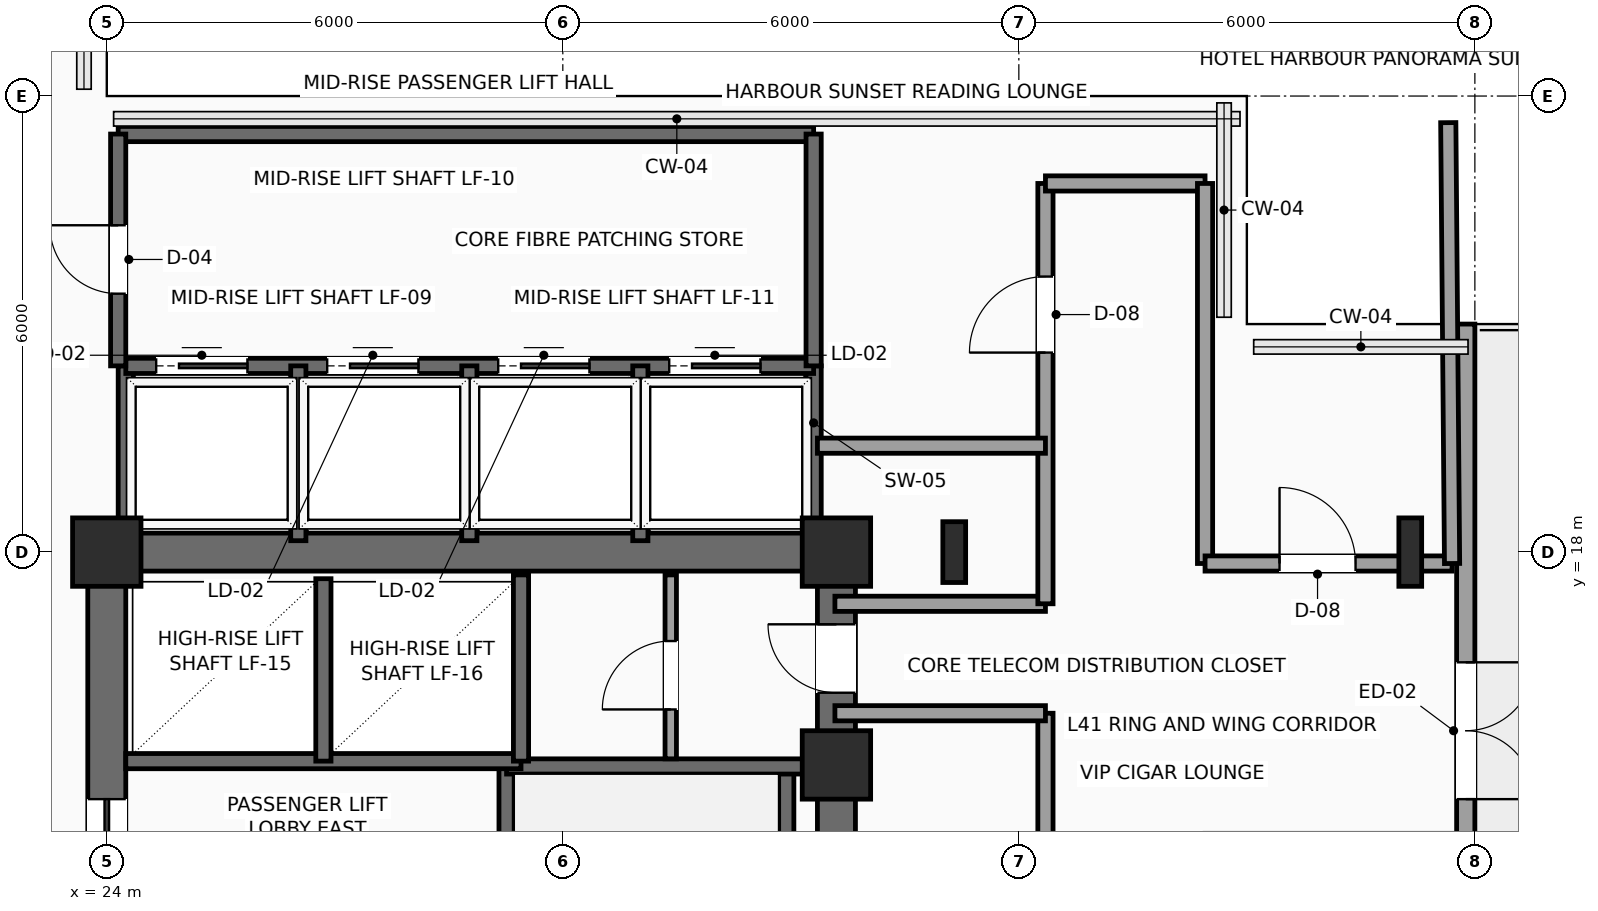
"""IFC4 building model, lengths in metres.
Left out: names, types, materials, properties, quantities, classifications, styles, units other than length and angle.
Written with IfcOpenShell. Run it as: python <this file> out.ifc"""

import sys

from ifc_helpers import new_model, si_unit, direction, frame, frame_2d, origin, origin_2d, place, context, subcontext, project, spatial, rectangle, i_section, extrude, element, fill, save


model = new_model("IFC4")
c1 = context("Model", 3, precision=1e-05, world=origin(), true_north=direction((0.0, 1.0)))
c2 = subcontext(c1, "Body", "Model", "MODEL_VIEW")
j1 = project(units=[si_unit("LENGTHUNIT", "METRE"), si_unit("PLANEANGLEUNIT", "RADIAN")], contexts=[c1])
p1 = place(None, origin())
s1 = spatial("IfcSite", under=j1, at=p1, CompositionType="ELEMENT")
p2 = place(p1, origin())
s2 = spatial("IfcBuilding", under=s1, at=p2, CompositionType="ELEMENT")
p3 = place(p2, frame((0.0, 0.0, 169.2)))
s3 = spatial("IfcBuildingStorey", under=s2, at=p3, CompositionType="ELEMENT", Elevation=169.2)
for number, where, z_axis, x_axis in (
    (1, (24.0, 18.0, 0.0), (0.0, 0.0, 1.0), (1.0, 0.0, 0.0)),
    (2, (33.6, 15.2, 0.0), (0.0, 0.0, 1.0), (1.0, 0.0, 0.0)),
    (3, (33.6, 18.0, 0.0), (0.0, 0.0, 1.0), (1.0, 0.0, 0.0)),
):
    element("IfcColumn", number, at=place(p3, frame(where, z_axis=z_axis, x_axis=x_axis)), inside=s3, PredefinedType="COLUMN", context=c2, shape_type="SweptSolid", body=[
        extrude(rectangle(XDim=0.9, YDim=0.9, at=origin_2d()), origin(), (0.0, 0.0, 1.0), 3.75),
    ])
p4 = place(p3, frame((35.15, 18.0, 0.0), z_axis=(0.0, 0.0, 1.0), x_axis=(1.0, 0.0, 0.0)))
e4 = element("IfcColumn", 4, at=p4, inside=s3, PredefinedType="COLUMN", context=c2, shape_type="SweptSolid", body=[
    extrude(i_section(OverallWidth=0.3, OverallDepth=0.8, WebThickness=0.018, FlangeThickness=0.033, FilletRadius=0.03, at=origin_2d()), origin(), (0.0, 0.0, 1.0), 3.75),
])
p5 = place(p3, frame((41.15, 18.0, 0.0), z_axis=(0.0, 0.0, 1.0), x_axis=(1.0, 0.0, 0.0)))
e5 = element("IfcColumn", 5, at=p5, inside=s3, PredefinedType="COLUMN", context=c2, shape_type="SweptSolid", body=[
    extrude(i_section(OverallWidth=0.3, OverallDepth=0.9, WebThickness=0.019, FlangeThickness=0.035, FilletRadius=0.03, at=origin_2d()), origin(), (0.0, 0.0, 1.0), 3.75),
])
p6 = place(p3, frame((41.88, 21.0, 0.0), z_axis=(0.0, 0.0, 1.0), x_axis=(0.0, -1.0, 0.0)))
e6 = element("IfcWall", 6, at=p6, inside=s3, PredefinedType="SOLIDWALL", context=c2, shape_type="SweptSolid", body=[
    extrude(rectangle(XDim=18.0, YDim=0.24, at=frame_2d((9.0, 0.0))), origin(), (0.0, 0.0, 1.0), 3.54),
])
p7 = place(p6, frame((4.45, 0.0, 0.0)))
e7 = element("IfcOpeningElement", 7, at=p7, cuts=e6, PredefinedType="OPENING", context=c2, shape_type="SweptSolid", body=[
    extrude(rectangle(XDim=1.8, YDim=2.4, at=frame_2d((0.9, 1.2))), frame((0.0, 0.13, 0.0), z_axis=(0.0, -1.0, 0.0), x_axis=(1.0, 0.0, 0.0)), (0.0, 0.0, 1.0), 0.26),
])
p8 = place(p3, frame((24.0, 18.0, 0.0), z_axis=(0.0, 0.0, 1.0), x_axis=(1.0, 0.0, 0.0)))
e8 = element("IfcWall", 8, at=p8, inside=s3, PredefinedType="SHEAR", context=c2, shape_type="SweptSolid", body=[
    extrude(rectangle(XDim=9.6, YDim=0.5, at=frame_2d((4.8, 0.0))), origin(), (0.0, 0.0, 1.0), 3.54),
])
p9 = place(p3, frame((24.0, 6.0, 0.0), z_axis=(0.0, 0.0, 1.0), x_axis=(0.0, 1.0, 0.0)))
e9 = element("IfcWall", 9, at=p9, inside=s3, PredefinedType="SHEAR", context=c2, shape_type="SweptSolid", body=[
    extrude(rectangle(XDim=12.0, YDim=0.5, at=frame_2d((6.0, 0.0))), origin(), (0.0, 0.0, 1.0), 3.54),
])
p10 = place(p9, frame((7.15, 0.0, 0.0)))
e10 = element("IfcOpeningElement", 10, at=p10, cuts=e9, PredefinedType="OPENING", context=c2, shape_type="SweptSolid", body=[
    extrude(rectangle(XDim=1.6, YDim=2.3, at=frame_2d((0.8, 1.15))), frame((0.0, 0.26, 0.0), z_axis=(0.0, -1.0, 0.0), x_axis=(1.0, 0.0, 0.0)), (0.0, 0.0, 1.0), 0.52),
])
p11 = place(p3, frame((33.6, 6.0, 0.0), z_axis=(0.0, 0.0, 1.0), x_axis=(0.0, 1.0, 0.0)))
e11 = element("IfcWall", 11, at=p11, inside=s3, PredefinedType="SHEAR", context=c2, shape_type="SweptSolid", body=[
    extrude(rectangle(XDim=12.0, YDim=0.5, at=frame_2d((6.0, 0.0))), origin(), (0.0, 0.0, 1.0), 3.54),
])
p12 = place(p11, frame((10.15, 0.0, 0.0)))
e12 = element("IfcOpeningElement", 12, at=p12, cuts=e11, PredefinedType="OPENING", context=c2, shape_type="SweptSolid", body=[
    extrude(rectangle(XDim=0.9, YDim=2.15, at=frame_2d((0.45, 1.075))), frame((0.0, 0.26, 0.0), z_axis=(0.0, -1.0, 0.0), x_axis=(1.0, 0.0, 0.0)), (0.0, 0.0, 1.0), 0.52),
])
p13 = place(p3, frame((29.26, 6.3, 0.0), z_axis=(0.0, 0.0, 1.0), x_axis=(0.0, 1.0, 0.0)))
e13 = element("IfcWall", 13, at=p13, inside=s3, PredefinedType="SHEAR", context=c2, shape_type="SweptSolid", body=[
    extrude(rectangle(XDim=8.88, YDim=0.2, at=frame_2d((4.44, 0.0))), origin(), (0.0, 0.0, 1.0), 3.54),
])
p14 = place(p13, frame((0.35, 0.0, 0.0)))
e14 = element("IfcOpeningElement", 14, at=p14, cuts=e13, PredefinedType="OPENING", context=c2, shape_type="SweptSolid", body=[
    extrude(rectangle(XDim=1.1, YDim=2.2, at=frame_2d((0.55, 1.1))), frame((0.0, 0.11, 0.0), z_axis=(0.0, -1.0, 0.0), x_axis=(1.0, 0.0, 0.0)), (0.0, 0.0, 1.0), 0.22),
])
p15 = place(p3, frame((32.94, 6.3, 0.0), z_axis=(0.0, 0.0, 1.0), x_axis=(0.0, 1.0, 0.0)))
e15 = element("IfcWall", 15, at=p15, inside=s3, PredefinedType="SHEAR", context=c2, shape_type="SweptSolid", body=[
    extrude(rectangle(XDim=8.88, YDim=0.2, at=frame_2d((4.44, 0.0))), origin(), (0.0, 0.0, 1.0), 3.54),
])
p16 = place(p3, frame((29.26, 15.18, 0.0), z_axis=(0.0, 0.0, 1.0), x_axis=(1.0, 0.0, 0.0)))
e16 = element("IfcWall", 16, at=p16, inside=s3, PredefinedType="SHEAR", context=c2, shape_type="SweptSolid", body=[
    extrude(rectangle(XDim=4.04, YDim=0.2, at=frame_2d((2.02, 0.0))), origin(), (0.0, 0.0, 1.0), 3.54),
])
p17 = place(p3, frame((24.25, 15.25, 0.0), z_axis=(0.0, 0.0, 1.0), x_axis=(1.0, 0.0, 0.0)))
e17 = element("IfcWall", 17, at=p17, inside=s3, PredefinedType="SHEAR", context=c2, shape_type="SweptSolid", body=[
    extrude(rectangle(XDim=5.2, YDim=0.2, at=frame_2d((2.6, 0.0))), origin(), (0.0, 0.0, 1.0), 3.54),
])
p18 = place(p3, frame((26.85, 15.25, 0.0), z_axis=(0.0, 0.0, 1.0), x_axis=(0.0, 1.0, 0.0)))
e18 = element("IfcWall", 18, at=p18, inside=s3, PredefinedType="SHEAR", context=c2, shape_type="SweptSolid", body=[
    extrude(rectangle(XDim=2.4, YDim=0.2, at=frame_2d((1.2, 0.0))), origin(), (0.0, 0.0, 1.0), 3.54),
])
p19 = place(p3, frame((29.45, 15.25, 0.0), z_axis=(0.0, 0.0, 1.0), x_axis=(0.0, 1.0, 0.0)))
e19 = element("IfcWall", 19, at=p19, inside=s3, PredefinedType="SHEAR", context=c2, shape_type="SweptSolid", body=[
    extrude(rectangle(XDim=2.45, YDim=0.2, at=frame_2d((1.225, 0.0))), origin(), (0.0, 0.0, 1.0), 3.54),
])
p20 = place(p3, frame((31.42, 15.28, 0.0), z_axis=(0.0, 0.0, 1.0), x_axis=(0.0, 1.0, 0.0)))
e20 = element("IfcWall", 20, at=p20, inside=s3, PredefinedType="PARTITIONING", context=c2, shape_type="SweptSolid", body=[
    extrude(rectangle(XDim=2.42, YDim=0.15, at=frame_2d((1.21, 0.0))), origin(), (0.0, 0.0, 1.0), 3.54),
])
p21 = place(p20, frame((0.65, 0.0, 0.0)))
e21 = element("IfcOpeningElement", 21, at=p21, cuts=e20, PredefinedType="OPENING", context=c2, shape_type="SweptSolid", body=[
    extrude(rectangle(XDim=0.9, YDim=2.15, at=frame_2d((0.45, 1.075))), frame((0.0, 0.085, 0.0), z_axis=(0.0, -1.0, 0.0), x_axis=(1.0, 0.0, 0.0)), (0.0, 0.0, 1.0), 0.17),
])
for number, where, z_axis, x_axis in (
    (22, (33.3, 18.1, 0.0), (0.0, 0.0, 1.0), (0.0, 1.0, 0.0)),
    (23, (24.25, 18.1, 0.0), (0.0, 0.0, 1.0), (0.0, 1.0, 0.0)),
):
    element("IfcWall", number, at=place(p3, frame(where, z_axis=z_axis, x_axis=x_axis)), inside=s3, PredefinedType="SHEAR", context=c2, shape_type="SweptSolid", body=[
        extrude(rectangle(XDim=2.35, YDim=0.2, at=frame_2d((1.175, 0.0))), origin(), (0.0, 0.0, 1.0), 3.54),
    ])
p22 = place(p3, frame((24.25, 20.45, 0.0), z_axis=(0.0, 0.0, 1.0), x_axis=(1.0, 0.0, 0.0)))
e24 = element("IfcWall", 24, at=p22, inside=s3, PredefinedType="SHEAR", context=c2, shape_type="SweptSolid", body=[
    extrude(rectangle(XDim=9.05, YDim=0.2, at=frame_2d((4.525, 0.0))), origin(), (0.0, 0.0, 1.0), 3.54),
])
p23 = place(p22, frame((0.4, 0.0, 0.0)))
e25 = element("IfcOpeningElement", 25, at=p23, cuts=e24, PredefinedType="OPENING", context=c2, shape_type="SweptSolid", body=[
    extrude(rectangle(XDim=1.2, YDim=2.2, at=frame_2d((0.6, 1.1))), frame((0.0, 0.11, 0.0), z_axis=(0.0, -1.0, 0.0), x_axis=(1.0, 0.0, 0.0)), (0.0, 0.0, 1.0), 0.22),
])
p24 = place(p22, frame((2.65, 0.0, 0.0)))
e26 = element("IfcOpeningElement", 26, at=p24, cuts=e24, PredefinedType="OPENING", context=c2, shape_type="SweptSolid", body=[
    extrude(rectangle(XDim=1.2, YDim=2.2, at=frame_2d((0.6, 1.1))), frame((0.0, 0.11, 0.0), z_axis=(0.0, -1.0, 0.0), x_axis=(1.0, 0.0, 0.0)), (0.0, 0.0, 1.0), 0.22),
])
p25 = place(p22, frame((4.9, 0.0, 0.0)))
e27 = element("IfcOpeningElement", 27, at=p25, cuts=e24, PredefinedType="OPENING", context=c2, shape_type="SweptSolid", body=[
    extrude(rectangle(XDim=1.2, YDim=2.2, at=frame_2d((0.6, 1.1))), frame((0.0, 0.11, 0.0), z_axis=(0.0, -1.0, 0.0), x_axis=(1.0, 0.0, 0.0)), (0.0, 0.0, 1.0), 0.22),
])
p26 = place(p22, frame((7.15, 0.0, 0.0)))
e28 = element("IfcOpeningElement", 28, at=p26, cuts=e24, PredefinedType="OPENING", context=c2, shape_type="SweptSolid", body=[
    extrude(rectangle(XDim=1.2, YDim=2.2, at=frame_2d((0.6, 1.1))), frame((0.0, 0.11, 0.0), z_axis=(0.0, -1.0, 0.0), x_axis=(1.0, 0.0, 0.0)), (0.0, 0.0, 1.0), 0.22),
])
for number, where, z_axis, x_axis in (
    (29, (26.52, 18.15, 0.0), (0.0, 0.0, 1.0), (0.0, 1.0, 0.0)),
    (30, (28.77, 18.15, 0.0), (0.0, 0.0, 1.0), (0.0, 1.0, 0.0)),
    (31, (31.02, 18.15, 0.0), (0.0, 0.0, 1.0), (0.0, 1.0, 0.0)),
):
    element("IfcWall", number, at=place(p3, frame(where, z_axis=z_axis, x_axis=x_axis)), inside=s3, PredefinedType="SHEAR", context=c2, shape_type="SweptSolid", body=[
        extrude(rectangle(XDim=2.3, YDim=0.2, at=frame_2d((1.15, 0.0))), origin(), (0.0, 0.0, 1.0), 3.54),
    ])
p27 = place(p3, frame((24.15, 23.5, 0.0), z_axis=(0.0, 0.0, 1.0), x_axis=(1.0, 0.0, 0.0)))
e32 = element("IfcWall", 32, at=p27, inside=s3, PredefinedType="SHEAR", context=c2, shape_type="SweptSolid", body=[
    extrude(rectangle(XDim=9.15, YDim=0.2, at=frame_2d((4.575, 0.0))), origin(), (0.0, 0.0, 1.0), 3.54),
])
p28 = place(p3, frame((33.3, 20.45, 0.0), z_axis=(0.0, 0.0, 1.0), x_axis=(0.0, 1.0, 0.0)))
e33 = element("IfcWall", 33, at=p28, inside=s3, PredefinedType="SHEAR", context=c2, shape_type="SweptSolid", body=[
    extrude(rectangle(XDim=3.05, YDim=0.2, at=frame_2d((1.525, 0.0))), origin(), (0.0, 0.0, 1.0), 3.54),
])
p29 = place(p3, frame((24.15, 20.45, 0.0), z_axis=(0.0, 0.0, 1.0), x_axis=(0.0, 1.0, 0.0)))
e34 = element("IfcWall", 34, at=p29, inside=s3, PredefinedType="SHEAR", context=c2, shape_type="SweptSolid", body=[
    extrude(rectangle(XDim=3.05, YDim=0.2, at=frame_2d((1.525, 0.0))), origin(), (0.0, 0.0, 1.0), 3.54),
])
p30 = place(p29, frame((0.95, 0.0, 0.0)))
e35 = element("IfcOpeningElement", 35, at=p30, cuts=e34, PredefinedType="OPENING", context=c2, shape_type="SweptSolid", body=[
    extrude(rectangle(XDim=0.9, YDim=2.15, at=frame_2d((0.45, 1.075))), frame((0.0, 0.11, 0.0), z_axis=(0.0, -1.0, 0.0), x_axis=(1.0, 0.0, 0.0)), (0.0, 0.0, 1.0), 0.22),
])
p31 = place(p3, frame((36.35, 5.8, 0.0), z_axis=(0.0, 0.0, 1.0), x_axis=(0.0, 1.0, 0.0)))
e36 = element("IfcWall", 36, at=p31, inside=s3, PredefinedType="PARTITIONING", context=c2, shape_type="SweptSolid", body=[
    extrude(rectangle(XDim=10.08, YDim=0.2, at=frame_2d((5.04, 0.0))), origin(), (0.0, 0.0, 1.0), 3.54),
])
p32 = place(p31, frame((2.0, 0.0, 0.0)))
e37 = element("IfcOpeningElement", 37, at=p32, cuts=e36, PredefinedType="OPENING", context=c2, shape_type="SweptSolid", body=[
    extrude(rectangle(XDim=1.0, YDim=2.2, at=frame_2d((0.5, 1.1))), frame((0.0, 0.11, 0.0), z_axis=(0.0, -1.0, 0.0), x_axis=(1.0, 0.0, 0.0)), (0.0, 0.0, 1.0), 0.22),
])
p33 = place(p31, frame((7.04, 0.0, 0.0)))
e38 = element("IfcOpeningElement", 38, at=p33, cuts=e36, PredefinedType="OPENING", context=c2, shape_type="SweptSolid", body=[
    extrude(rectangle(XDim=1.0, YDim=2.2, at=frame_2d((0.5, 1.1))), frame((0.0, 0.11, 0.0), z_axis=(0.0, -1.0, 0.0), x_axis=(1.0, 0.0, 0.0)), (0.0, 0.0, 1.0), 0.22),
])
for number, where, z_axis, x_axis in (
    (39, (36.35, 15.88, 0.0), (0.0, 0.0, 1.0), (-1.0, 0.0, 0.0)),
    (40, (33.58, 17.32, 0.0), (0.0, 0.0, 1.0), (1.0, 0.0, 0.0)),
):
    element("IfcWall", number, at=place(p3, frame(where, z_axis=z_axis, x_axis=x_axis)), inside=s3, PredefinedType="PARTITIONING", context=c2, shape_type="SweptSolid", body=[
        extrude(rectangle(XDim=2.77, YDim=0.2, at=frame_2d((1.385, 0.0))), origin(), (0.0, 0.0, 1.0), 3.54),
    ])
p34 = place(p3, frame((36.35, 17.32, 0.0), z_axis=(0.0, 0.0, 1.0), x_axis=(0.0, 1.0, 0.0)))
e41 = element("IfcWall", 41, at=p34, inside=s3, PredefinedType="PARTITIONING", context=c2, shape_type="SweptSolid", body=[
    extrude(rectangle(XDim=5.53, YDim=0.2, at=frame_2d((2.765, 0.0))), origin(), (0.0, 0.0, 1.0), 3.54),
])
p35 = place(p34, frame((3.305, 0.0, 0.0)))
e42 = element("IfcOpeningElement", 42, at=p35, cuts=e41, PredefinedType="OPENING", context=c2, shape_type="SweptSolid", body=[
    extrude(rectangle(XDim=1.0, YDim=2.2, at=frame_2d((0.5, 1.1))), frame((0.0, 0.11, 0.0), z_axis=(0.0, -1.0, 0.0), x_axis=(1.0, 0.0, 0.0)), (0.0, 0.0, 1.0), 0.22),
])
p36 = place(p3, frame((36.35, 22.85, 0.0), z_axis=(0.0, 0.0, 1.0), x_axis=(1.0, 0.0, 0.0)))
e43 = element("IfcWall", 43, at=p36, inside=s3, PredefinedType="PARTITIONING", context=c2, shape_type="SweptSolid", body=[
    extrude(rectangle(XDim=2.1, YDim=0.2, at=frame_2d((1.05, 0.0))), origin(), (0.0, 0.0, 1.0), 3.54),
])
p37 = place(p3, frame((38.45, 22.85, 0.0), z_axis=(0.0, 0.0, 1.0), x_axis=(0.0, -1.0, 0.0)))
e44 = element("IfcWall", 44, at=p37, inside=s3, PredefinedType="PARTITIONING", context=c2, shape_type="SweptSolid", body=[
    extrude(rectangle(XDim=5.0, YDim=0.2, at=frame_2d((2.5, 0.0))), origin(), (0.0, 0.0, 1.0), 3.54),
])
p38 = place(p3, frame((38.45, 17.85, 0.0), z_axis=(0.0, 0.0, 1.0), x_axis=(1.0, 0.0, 0.0)))
e45 = element("IfcWall", 45, at=p38, inside=s3, PredefinedType="PARTITIONING", context=c2, shape_type="SweptSolid", body=[
    extrude(rectangle(XDim=3.25, YDim=0.2, at=frame_2d((1.625, 0.0))), origin(), (0.0, 0.0, 1.0), 3.132),
])
p39 = place(p38, frame((0.98, 0.0, 0.0)))
e46 = element("IfcOpeningElement", 46, at=p39, cuts=e45, PredefinedType="OPENING", context=c2, shape_type="SweptSolid", body=[
    extrude(rectangle(XDim=1.0, YDim=2.2, at=frame_2d((0.5, 1.1))), frame((0.0, 0.11, 0.0), z_axis=(0.0, -1.0, 0.0), x_axis=(1.0, 0.0, 0.0)), (0.0, 0.0, 1.0), 0.22),
])
p40 = place(p3, frame((41.7, 17.85, 0.0), z_axis=(0.0, 0.0, 1.0), x_axis=(-0.008629077606, 0.999962768817, 0.0)))
e47 = element("IfcWall", 47, at=p40, inside=s3, PredefinedType="PARTITIONING", context=c2, shape_type="SweptSolid", body=[
    extrude(rectangle(XDim=5.8, YDim=0.2, at=frame_2d((2.9, 0.0))), origin(), (0.0, 0.0, 1.0), 3.54),
])
p41 = place(p3, frame((33.35, 19.4, 0.0), z_axis=(0.0, 0.0, 1.0), x_axis=(1.0, 0.0, 0.0)))
e48 = element("IfcWall", 48, at=p41, inside=s3, PredefinedType="PARTITIONING", context=c2, shape_type="SweptSolid", body=[
    extrude(rectangle(XDim=3.0, YDim=0.2, at=frame_2d((1.5, 0.0))), origin(), (0.0, 0.0, 1.0), 3.54),
])
p42 = place(p7, origin())
e49 = element("IfcDoor", 49, at=p42, inside=s3, OperationType="DOUBLE_DOOR_SINGLE_SWING", PredefinedType="DOOR", context=c2, shape_type="SweptSolid", body=[
    extrude(rectangle(XDim=1.8, YDim=2.4, at=frame_2d((0.9, 1.2))), frame((0.0, 0.025, 0.0), z_axis=(0.0, -1.0, 0.0), x_axis=(1.0, 0.0, 0.0)), (0.0, 0.0, 1.0), 0.05),
])
fill(e7, e49)
p43 = place(p10, origin())
e50 = element("IfcDoor", 50, at=p43, inside=s3, OperationType="DOUBLE_DOOR_SLIDING", PredefinedType="DOOR", context=c2, shape_type="SweptSolid", body=[
    extrude(rectangle(XDim=1.6, YDim=2.3, at=frame_2d((0.8, 1.15))), frame((0.0, 0.025, 0.0), z_axis=(0.0, -1.0, 0.0), x_axis=(1.0, 0.0, 0.0)), (0.0, 0.0, 1.0), 0.05),
])
fill(e10, e50)
p44 = place(p12, origin())
e51 = element("IfcDoor", 51, at=p44, inside=s3, OperationType="SINGLE_SWING_RIGHT", PredefinedType="DOOR", context=c2, shape_type="SweptSolid", body=[
    extrude(rectangle(XDim=0.9, YDim=2.15, at=frame_2d((0.45, 1.075))), frame((0.0, 0.025, 0.0), z_axis=(0.0, -1.0, 0.0), x_axis=(1.0, 0.0, 0.0)), (0.0, 0.0, 1.0), 0.05),
])
fill(e12, e51)
p45 = place(p21, origin())
e52 = element("IfcDoor", 52, at=p45, inside=s3, OperationType="SINGLE_SWING_LEFT", PredefinedType="DOOR", context=c2, shape_type="SweptSolid", body=[
    extrude(rectangle(XDim=0.9, YDim=2.15, at=frame_2d((0.45, 1.075))), frame((0.0, 0.025, 0.0), z_axis=(0.0, -1.0, 0.0), x_axis=(1.0, 0.0, 0.0)), (0.0, 0.0, 1.0), 0.05),
])
fill(e21, e52)
p46 = place(p23, origin())
e53 = element("IfcDoor", 53, at=p46, inside=s3, OperationType="SLIDING_TO_RIGHT", PredefinedType="DOOR", context=c2, shape_type="SweptSolid", body=[
    extrude(rectangle(XDim=1.2, YDim=2.2, at=frame_2d((0.6, 1.1))), frame((0.0, 0.025, 0.0), z_axis=(0.0, -1.0, 0.0), x_axis=(1.0, 0.0, 0.0)), (0.0, 0.0, 1.0), 0.05),
])
fill(e25, e53)
p47 = place(p24, origin())
e54 = element("IfcDoor", 54, at=p47, inside=s3, OperationType="SLIDING_TO_RIGHT", PredefinedType="DOOR", context=c2, shape_type="SweptSolid", body=[
    extrude(rectangle(XDim=1.2, YDim=2.2, at=frame_2d((0.6, 1.1))), frame((0.0, 0.025, 0.0), z_axis=(0.0, -1.0, 0.0), x_axis=(1.0, 0.0, 0.0)), (0.0, 0.0, 1.0), 0.05),
])
fill(e26, e54)
p48 = place(p25, origin())
e55 = element("IfcDoor", 55, at=p48, inside=s3, OperationType="SLIDING_TO_RIGHT", PredefinedType="DOOR", context=c2, shape_type="SweptSolid", body=[
    extrude(rectangle(XDim=1.2, YDim=2.2, at=frame_2d((0.6, 1.1))), frame((0.0, 0.025, 0.0), z_axis=(0.0, -1.0, 0.0), x_axis=(1.0, 0.0, 0.0)), (0.0, 0.0, 1.0), 0.05),
])
fill(e27, e55)
p49 = place(p26, origin())
e56 = element("IfcDoor", 56, at=p49, inside=s3, OperationType="SLIDING_TO_RIGHT", PredefinedType="DOOR", context=c2, shape_type="SweptSolid", body=[
    extrude(rectangle(XDim=1.2, YDim=2.2, at=frame_2d((0.6, 1.1))), frame((0.0, 0.025, 0.0), z_axis=(0.0, -1.0, 0.0), x_axis=(1.0, 0.0, 0.0)), (0.0, 0.0, 1.0), 0.05),
])
fill(e28, e56)
p50 = place(p30, origin())
e57 = element("IfcDoor", 57, at=p50, inside=s3, OperationType="SINGLE_SWING_RIGHT", PredefinedType="DOOR", context=c2, shape_type="SweptSolid", body=[
    extrude(rectangle(XDim=0.9, YDim=2.15, at=frame_2d((0.45, 1.075))), frame((0.0, 0.025, 0.0), z_axis=(0.0, -1.0, 0.0), x_axis=(1.0, 0.0, 0.0)), (0.0, 0.0, 1.0), 0.05),
])
fill(e35, e57)
p51 = place(p35, origin())
e58 = element("IfcDoor", 58, at=p51, inside=s3, OperationType="SINGLE_SWING_LEFT", PredefinedType="DOOR", context=c2, shape_type="SweptSolid", body=[
    extrude(rectangle(XDim=1.0, YDim=2.2, at=frame_2d((0.5, 1.1))), frame((0.0, 0.025, 0.0), z_axis=(0.0, -1.0, 0.0), x_axis=(1.0, 0.0, 0.0)), (0.0, 0.0, 1.0), 0.05),
])
fill(e42, e58)
p52 = place(p39, origin())
e59 = element("IfcDoor", 59, at=p52, inside=s3, OperationType="SINGLE_SWING_LEFT", PredefinedType="DOOR", context=c2, shape_type="SweptSolid", body=[
    extrude(rectangle(XDim=1.0, YDim=2.2, at=frame_2d((0.5, 1.1))), frame((0.0, 0.025, 0.0), z_axis=(0.0, -1.0, 0.0), x_axis=(1.0, 0.0, 0.0)), (0.0, 0.0, 1.0), 0.05),
])
fill(e46, e59)
save(model, sys.argv[1])
